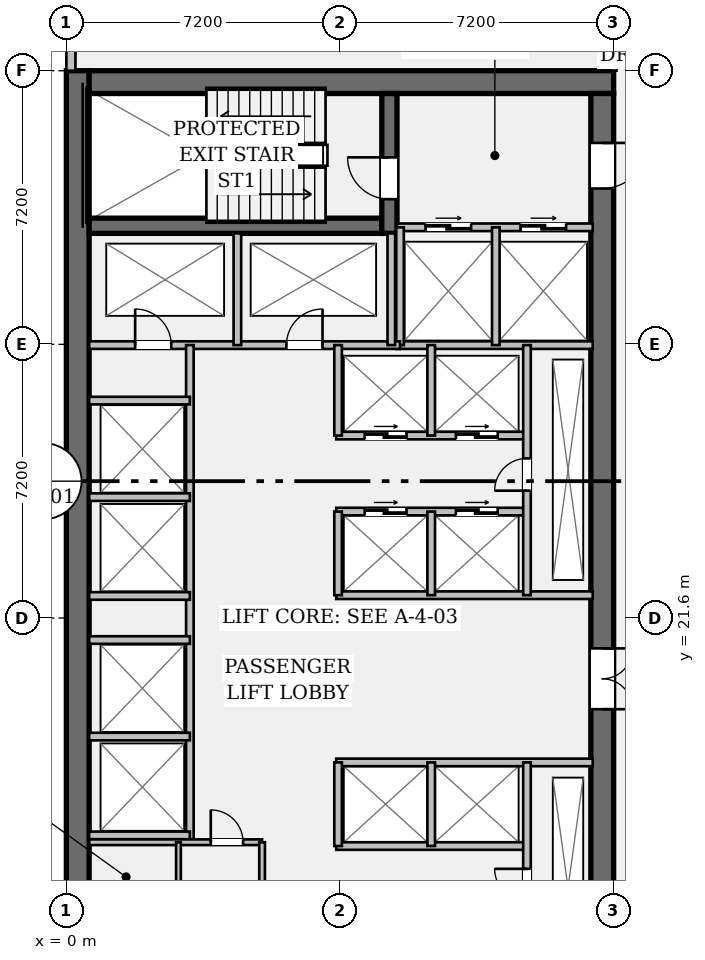
"""IFC4 building model, lengths in metres.
Left out: names, types, materials, properties, quantities, classifications, styles, units other than length and angle.
Written with IfcOpenShell. Run it as: python <this file> out.ifc"""

import sys

from ifc_helpers import new_model, si_unit, direction, frame, frame_2d, origin, place, context, subcontext, project, spatial, rectangle, extrude, element, fill, save


model = new_model("IFC4")
c1 = context("Model", 3, precision=1e-05, world=origin(), true_north=direction((0.0, 1.0)))
c2 = subcontext(c1, "Body", "Model", "MODEL_VIEW")
j1 = project(units=[si_unit("LENGTHUNIT", "METRE"), si_unit("PLANEANGLEUNIT", "RADIAN")], contexts=[c1])
p1 = place(None, origin())
s1 = spatial("IfcSite", under=j1, at=p1, CompositionType="ELEMENT")
p2 = place(p1, origin())
s2 = spatial("IfcBuilding", under=s1, at=p2, CompositionType="ELEMENT")
p3 = place(p2, frame((0.0, 0.0, 9.45)))
s3 = spatial("IfcBuildingStorey", under=s2, at=p3, CompositionType="ELEMENT", Elevation=9.45)
p4 = place(p3, frame((0.3, 7.2, 0.0), z_axis=(0.0, 0.0, 1.0), x_axis=(0.0, 1.0, 0.0)))
e1 = element("IfcWall", 1, at=p4, inside=s3, PredefinedType="SHEAR", context=c2, shape_type="SweptSolid", body=[
    extrude(rectangle(XDim=28.8, YDim=0.6, at=frame_2d((14.4, 0.0))), origin(), (0.0, 0.0, 1.0), 3.9),
])
p5 = place(p3, frame((0.6, 35.7, 0.0), z_axis=(0.0, 0.0, 1.0), x_axis=(1.0, 0.0, 0.0)))
e2 = element("IfcWall", 2, at=p5, inside=s3, PredefinedType="SHEAR", context=c2, shape_type="SweptSolid", body=[
    extrude(rectangle(XDim=13.8, YDim=0.6, at=frame_2d((6.9, 0.0))), origin(), (0.0, 0.0, 1.0), 3.9),
])
p6 = place(p3, frame((14.1, 35.4, 0.0), z_axis=(0.0, 0.0, 1.0), x_axis=(0.0, -1.0, 0.0)))
e3 = element("IfcWall", 3, at=p6, inside=s3, PredefinedType="SHEAR", context=c2, shape_type="SweptSolid", body=[
    extrude(rectangle(XDim=27.6, YDim=0.6, at=frame_2d((13.8, 0.0))), origin(), (0.0, 0.0, 1.0), 3.9),
])
p7 = place(p6, frame((1.3, 0.0, 0.0)))
e4 = element("IfcOpeningElement", 4, at=p7, cuts=e3, PredefinedType="OPENING", context=c2, shape_type="SweptSolid", body=[
    extrude(rectangle(XDim=1.2, YDim=2.15, at=frame_2d((0.6, 1.075))), frame((0.0, 0.312, 0.0), z_axis=(0.0, -1.0, 0.0), x_axis=(1.0, 0.0, 0.0)), (0.0, 0.0, 1.0), 0.624),
])
p8 = place(p6, frame((25.25, 0.0, 0.0)))
e5 = element("IfcOpeningElement", 5, at=p8, cuts=e3, PredefinedType="OPENING", context=c2, shape_type="SweptSolid", body=[
    extrude(rectangle(XDim=1.2, YDim=2.15, at=frame_2d((0.6, 1.075))), frame((0.0, 0.312, 0.0), z_axis=(0.0, -1.0, 0.0), x_axis=(1.0, 0.0, 0.0)), (0.0, 0.0, 1.0), 0.624),
])
p9 = place(p6, frame((14.6, 0.0, 0.0)))
e6 = element("IfcOpeningElement", 6, at=p9, cuts=e3, PredefinedType="OPENING", context=c2, shape_type="SweptSolid", body=[
    extrude(rectangle(XDim=1.6, YDim=2.2, at=frame_2d((0.8, 1.1))), frame((0.0, 0.312, 0.0), z_axis=(0.0, -1.0, 0.0), x_axis=(1.0, 0.0, 0.0)), (0.0, 0.0, 1.0), 0.624),
])
p10 = place(p3, frame((0.6, 31.92, 0.0), z_axis=(0.0, 0.0, 1.0), x_axis=(1.0, 0.0, 0.0)))
e7 = element("IfcWall", 7, at=p10, inside=s3, PredefinedType="SHEAR", context=c2, shape_type="SweptSolid", body=[
    extrude(rectangle(XDim=7.7, YDim=0.4, at=frame_2d((3.85, 0.0))), origin(), (0.0, 0.0, 1.0), 3.9),
])
p11 = place(p3, frame((8.5, 31.72, 0.0), z_axis=(0.0, 0.0, 1.0), x_axis=(0.0, 1.0, 0.0)))
e8 = element("IfcWall", 8, at=p11, inside=s3, PredefinedType="SHEAR", context=c2, shape_type="SweptSolid", body=[
    extrude(rectangle(XDim=3.68, YDim=0.4, at=frame_2d((1.84, 0.0))), origin(), (0.0, 0.0, 1.0), 3.9),
])
p12 = place(p11, frame((0.9, 0.0, 0.0)))
e9 = element("IfcOpeningElement", 9, at=p12, cuts=e8, PredefinedType="OPENING", context=c2, shape_type="SweptSolid", body=[
    extrude(rectangle(XDim=1.1, YDim=2.15, at=frame_2d((0.55, 1.075))), frame((0.0, 0.212, 0.0), z_axis=(0.0, -1.0, 0.0), x_axis=(1.0, 0.0, 0.0)), (0.0, 0.0, 1.0), 0.424),
])
p13 = place(p3, frame((0.12, 36.0, 0.0), z_axis=(0.0, 0.0, 1.0), x_axis=(0.0, 1.0, 0.0)))
e10 = element("IfcWall", 10, at=p13, inside=s3, PredefinedType="STANDARD", context=c2, shape_type="SweptSolid", body=[
    extrude(rectangle(XDim=11.58, YDim=0.24, at=frame_2d((5.79, 0.0))), origin(), (0.0, 0.0, 1.0), 3.9),
])
p14 = place(p13, frame((4.74, 0.0, 0.95)))
e11 = element("IfcOpeningElement", 11, at=p14, cuts=e10, PredefinedType="OPENING", context=c2, shape_type="SweptSolid", body=[
    extrude(rectangle(XDim=2.1, YDim=1.8, at=frame_2d((1.05, 0.9))), frame((0.0, 0.132, 0.0), z_axis=(0.0, -1.0, 0.0), x_axis=(1.0, 0.0, 0.0)), (0.0, 0.0, 1.0), 0.264),
])
p15 = place(p3, frame((8.7, 31.88, 0.0), z_axis=(0.0, 0.0, 1.0), x_axis=(1.0, 0.0, 0.0)))
e12 = element("IfcWall", 12, at=p15, inside=s3, PredefinedType="PARTITIONING", context=c2, shape_type="SweptSolid", body=[
    extrude(rectangle(XDim=5.15, YDim=0.2, at=frame_2d((2.575, 0.0))), origin(), (0.0, 0.0, 1.0), 3.9),
])
p16 = place(p15, frame((0.75, 0.0, 0.0)))
e13 = element("IfcOpeningElement", 13, at=p16, cuts=e12, PredefinedType="OPENING", context=c2, shape_type="SweptSolid", body=[
    extrude(rectangle(XDim=1.2, YDim=2.2, at=frame_2d((0.6, 1.1))), frame((0.0, 0.112, 0.0), z_axis=(0.0, -1.0, 0.0), x_axis=(1.0, 0.0, 0.0)), (0.0, 0.0, 1.0), 0.224),
])
p17 = place(p15, frame((3.25, 0.0, 0.0)))
e14 = element("IfcOpeningElement", 14, at=p17, cuts=e12, PredefinedType="OPENING", context=c2, shape_type="SweptSolid", body=[
    extrude(rectangle(XDim=1.2, YDim=2.2, at=frame_2d((0.6, 1.1))), frame((0.0, 0.112, 0.0), z_axis=(0.0, -1.0, 0.0), x_axis=(1.0, 0.0, 0.0)), (0.0, 0.0, 1.0), 0.224),
])
p18 = place(p3, frame((8.7, 28.78, 0.0), z_axis=(0.0, 0.0, 1.0), x_axis=(1.0, 0.0, 0.0)))
e15 = element("IfcWall", 15, at=p18, inside=s3, PredefinedType="PARTITIONING", context=c2, shape_type="SweptSolid", body=[
    extrude(rectangle(XDim=5.15, YDim=0.2, at=frame_2d((2.575, 0.0))), origin(), (0.0, 0.0, 1.0), 3.9),
])
for number, where, z_axis, x_axis in (
    (16, (8.78, 28.78, 0.0), (0.0, 0.0, 1.0), (0.0, 1.0, 0.0)),
    (17, (11.3, 28.78, 0.0), (0.0, 0.0, 1.0), (0.0, 1.0, 0.0)),
):
    element("IfcWall", number, at=place(p3, frame(where, z_axis=z_axis, x_axis=x_axis)), inside=s3, PredefinedType="PARTITIONING", context=c2, shape_type="SweptSolid", body=[
        extrude(rectangle(XDim=3.1, YDim=0.2, at=frame_2d((1.55, 0.0))), origin(), (0.0, 0.0, 1.0), 3.9),
    ])
p19 = place(p3, frame((0.6, 28.78, 0.0), z_axis=(0.0, 0.0, 1.0), x_axis=(1.0, 0.0, 0.0)))
e18 = element("IfcWall", 18, at=p19, inside=s3, PredefinedType="PARTITIONING", context=c2, shape_type="SweptSolid", body=[
    extrude(rectangle(XDim=8.18, YDim=0.2, at=frame_2d((4.09, 0.0))), origin(), (0.0, 0.0, 1.0), 3.9),
])
p20 = place(p19, frame((1.21, 0.0, 0.0)))
e19 = element("IfcOpeningElement", 19, at=p20, cuts=e18, PredefinedType="OPENING", context=c2, shape_type="SweptSolid", body=[
    extrude(rectangle(XDim=0.95, YDim=2.15, at=frame_2d((0.475, 1.075))), frame((0.0, 0.112, 0.0), z_axis=(0.0, -1.0, 0.0), x_axis=(1.0, 0.0, 0.0)), (0.0, 0.0, 1.0), 0.224),
])
p21 = place(p19, frame((5.19, 0.0, 0.0)))
e20 = element("IfcOpeningElement", 20, at=p21, cuts=e18, PredefinedType="OPENING", context=c2, shape_type="SweptSolid", body=[
    extrude(rectangle(XDim=0.95, YDim=2.15, at=frame_2d((0.475, 1.075))), frame((0.0, 0.112, 0.0), z_axis=(0.0, -1.0, 0.0), x_axis=(1.0, 0.0, 0.0)), (0.0, 0.0, 1.0), 0.224),
])
for number, where, z_axis, x_axis in (
    (21, (4.5, 28.78, 0.0), (0.0, 0.0, 1.0), (0.0, 1.0, 0.0)),
    (22, (8.55, 28.78, 0.0), (0.0, 0.0, 1.0), (0.0, 1.0, 0.0)),
):
    element("IfcWall", number, at=place(p3, frame(where, z_axis=z_axis, x_axis=x_axis)), inside=s3, PredefinedType="PARTITIONING", context=c2, shape_type="SweptSolid", body=[
        extrude(rectangle(XDim=2.94, YDim=0.2, at=frame_2d((1.47, 0.0))), origin(), (0.0, 0.0, 1.0), 3.9),
    ])
p22 = place(p3, frame((3.25, 15.7, 0.0), z_axis=(0.0, 0.0, 1.0), x_axis=(0.0, 1.0, 0.0)))
e23 = element("IfcWall", 23, at=p22, inside=s3, PredefinedType="PARTITIONING", context=c2, shape_type="SweptSolid", body=[
    extrude(rectangle(XDim=13.08, YDim=0.2, at=frame_2d((6.54, 0.0))), origin(), (0.0, 0.0, 1.0), 3.9),
])
for number, where, z_axis, x_axis in (
    (24, (0.6, 15.88, 0.0), (0.0, 0.0, 1.0), (1.0, 0.0, 0.0)),
    (25, (0.6, 18.48, 0.0), (0.0, 0.0, 1.0), (1.0, 0.0, 0.0)),
    (26, (0.6, 22.18, 0.0), (0.0, 0.0, 1.0), (1.0, 0.0, 0.0)),
    (27, (0.6, 24.78, 0.0), (0.0, 0.0, 1.0), (1.0, 0.0, 0.0)),
    (28, (0.6, 21.02, 0.0), (0.0, 0.0, 1.0), (1.0, 0.0, 0.0)),
    (29, (0.6, 27.32, 0.0), (0.0, 0.0, 1.0), (1.0, 0.0, 0.0)),
):
    element("IfcWall", number, at=place(p3, frame(where, z_axis=z_axis, x_axis=x_axis)), inside=s3, PredefinedType="PARTITIONING", context=c2, shape_type="SweptSolid", body=[
        extrude(rectangle(XDim=2.65, YDim=0.2, at=frame_2d((1.325, 0.0))), origin(), (0.0, 0.0, 1.0), 3.9),
    ])
p23 = place(p3, frame((7.1, 22.2, 0.0), z_axis=(0.0, 0.0, 1.0), x_axis=(1.0, 0.0, 0.0)))
e30 = element("IfcWall", 30, at=p23, inside=s3, PredefinedType="PARTITIONING", context=c2, shape_type="SweptSolid", body=[
    extrude(rectangle(XDim=6.75, YDim=0.2, at=frame_2d((3.375, 0.0))), origin(), (0.0, 0.0, 1.0), 3.9),
])
p24 = place(p3, frame((7.1, 24.4, 0.0), z_axis=(0.0, 0.0, 1.0), x_axis=(1.0, 0.0, 0.0)))
e31 = element("IfcWall", 31, at=p24, inside=s3, PredefinedType="PARTITIONING", context=c2, shape_type="SweptSolid", body=[
    extrude(rectangle(XDim=5.02, YDim=0.2, at=frame_2d((2.51, 0.0))), origin(), (0.0, 0.0, 1.0), 3.9),
])
p25 = place(p24, frame((0.75, 0.0, 0.0)))
e32 = element("IfcOpeningElement", 32, at=p25, cuts=e31, PredefinedType="OPENING", context=c2, shape_type="SweptSolid", body=[
    extrude(rectangle(XDim=1.1, YDim=2.2, at=frame_2d((0.55, 1.1))), frame((0.0, 0.112, 0.0), z_axis=(0.0, -1.0, 0.0), x_axis=(1.0, 0.0, 0.0)), (0.0, 0.0, 1.0), 0.224),
])
p26 = place(p24, frame((3.15, 0.0, 0.0)))
e33 = element("IfcOpeningElement", 33, at=p26, cuts=e31, PredefinedType="OPENING", context=c2, shape_type="SweptSolid", body=[
    extrude(rectangle(XDim=1.1, YDim=2.2, at=frame_2d((0.55, 1.1))), frame((0.0, 0.112, 0.0), z_axis=(0.0, -1.0, 0.0), x_axis=(1.0, 0.0, 0.0)), (0.0, 0.0, 1.0), 0.224),
])
p27 = place(p3, frame((7.1, 26.4, 0.0), z_axis=(0.0, 0.0, 1.0), x_axis=(1.0, 0.0, 0.0)))
e34 = element("IfcWall", 34, at=p27, inside=s3, PredefinedType="PARTITIONING", context=c2, shape_type="SweptSolid", body=[
    extrude(rectangle(XDim=5.02, YDim=0.2, at=frame_2d((2.51, 0.0))), origin(), (0.0, 0.0, 1.0), 3.9),
])
p28 = place(p27, frame((0.75, 0.0, 0.0)))
e35 = element("IfcOpeningElement", 35, at=p28, cuts=e34, PredefinedType="OPENING", context=c2, shape_type="SweptSolid", body=[
    extrude(rectangle(XDim=1.1, YDim=2.2, at=frame_2d((0.55, 1.1))), frame((0.0, 0.112, 0.0), z_axis=(0.0, -1.0, 0.0), x_axis=(1.0, 0.0, 0.0)), (0.0, 0.0, 1.0), 0.224),
])
p29 = place(p27, frame((3.15, 0.0, 0.0)))
e36 = element("IfcOpeningElement", 36, at=p29, cuts=e34, PredefinedType="OPENING", context=c2, shape_type="SweptSolid", body=[
    extrude(rectangle(XDim=1.1, YDim=2.2, at=frame_2d((0.55, 1.1))), frame((0.0, 0.112, 0.0), z_axis=(0.0, -1.0, 0.0), x_axis=(1.0, 0.0, 0.0)), (0.0, 0.0, 1.0), 0.224),
])
p30 = place(p3, frame((7.15, 22.2, 0.0), z_axis=(0.0, 0.0, 1.0), x_axis=(0.0, 1.0, 0.0)))
e37 = element("IfcWall", 37, at=p30, inside=s3, PredefinedType="PARTITIONING", context=c2, shape_type="SweptSolid", body=[
    extrude(rectangle(XDim=2.2, YDim=0.2, at=frame_2d((1.1, 0.0))), origin(), (0.0, 0.0, 1.0), 3.9),
])
p31 = place(p3, frame((7.15, 26.4, 0.0), z_axis=(0.0, 0.0, 1.0), x_axis=(0.0, 1.0, 0.0)))
e38 = element("IfcWall", 38, at=p31, inside=s3, PredefinedType="PARTITIONING", context=c2, shape_type="SweptSolid", body=[
    extrude(rectangle(XDim=2.38, YDim=0.2, at=frame_2d((1.19, 0.0))), origin(), (0.0, 0.0, 1.0), 3.9),
])
p32 = place(p3, frame((9.6, 22.2, 0.0), z_axis=(0.0, 0.0, 1.0), x_axis=(0.0, 1.0, 0.0)))
e39 = element("IfcWall", 39, at=p32, inside=s3, PredefinedType="PARTITIONING", context=c2, shape_type="SweptSolid", body=[
    extrude(rectangle(XDim=2.2, YDim=0.2, at=frame_2d((1.1, 0.0))), origin(), (0.0, 0.0, 1.0), 3.9),
])
p33 = place(p3, frame((9.6, 26.4, 0.0), z_axis=(0.0, 0.0, 1.0), x_axis=(0.0, 1.0, 0.0)))
e40 = element("IfcWall", 40, at=p33, inside=s3, PredefinedType="PARTITIONING", context=c2, shape_type="SweptSolid", body=[
    extrude(rectangle(XDim=2.38, YDim=0.2, at=frame_2d((1.19, 0.0))), origin(), (0.0, 0.0, 1.0), 3.9),
])
p34 = place(p3, frame((12.12, 22.2, 0.0), z_axis=(0.0, 0.0, 1.0), x_axis=(0.0, 1.0, 0.0)))
e41 = element("IfcWall", 41, at=p34, inside=s3, PredefinedType="PARTITIONING", context=c2, shape_type="SweptSolid", body=[
    extrude(rectangle(XDim=6.58, YDim=0.2, at=frame_2d((3.29, 0.0))), origin(), (0.0, 0.0, 1.0), 3.9),
])
p35 = place(p34, frame((2.75, 0.0, 0.0)))
e42 = element("IfcOpeningElement", 42, at=p35, cuts=e41, PredefinedType="OPENING", context=c2, shape_type="SweptSolid", body=[
    extrude(rectangle(XDim=0.85, YDim=2.15, at=frame_2d((0.425, 1.075))), frame((0.0, 0.112, 0.0), z_axis=(0.0, -1.0, 0.0), x_axis=(1.0, 0.0, 0.0)), (0.0, 0.0, 1.0), 0.224),
])
p36 = place(p3, frame((7.1, 17.8, 0.0), z_axis=(0.0, 0.0, 1.0), x_axis=(1.0, 0.0, 0.0)))
e43 = element("IfcWall", 43, at=p36, inside=s3, PredefinedType="PARTITIONING", context=c2, shape_type="SweptSolid", body=[
    extrude(rectangle(XDim=6.75, YDim=0.2, at=frame_2d((3.375, 0.0))), origin(), (0.0, 0.0, 1.0), 3.9),
])
p37 = place(p3, frame((7.1, 15.6, 0.0), z_axis=(0.0, 0.0, 1.0), x_axis=(1.0, 0.0, 0.0)))
e44 = element("IfcWall", 44, at=p37, inside=s3, PredefinedType="PARTITIONING", context=c2, shape_type="SweptSolid", body=[
    extrude(rectangle(XDim=5.02, YDim=0.2, at=frame_2d((2.51, 0.0))), origin(), (0.0, 0.0, 1.0), 3.9),
])
for number, where, z_axis, x_axis in (
    (45, (7.15, 15.6, 0.0), (0.0, 0.0, 1.0), (0.0, 1.0, 0.0)),
    (46, (9.6, 15.6, 0.0), (0.0, 0.0, 1.0), (0.0, 1.0, 0.0)),
):
    element("IfcWall", number, at=place(p3, frame(where, z_axis=z_axis, x_axis=x_axis)), inside=s3, PredefinedType="PARTITIONING", context=c2, shape_type="SweptSolid", body=[
        extrude(rectangle(XDim=2.2, YDim=0.2, at=frame_2d((1.1, 0.0))), origin(), (0.0, 0.0, 1.0), 3.9),
    ])
p38 = place(p3, frame((12.12, 11.2, 0.0), z_axis=(0.0, 0.0, 1.0), x_axis=(0.0, 1.0, 0.0)))
e47 = element("IfcWall", 47, at=p38, inside=s3, PredefinedType="PARTITIONING", context=c2, shape_type="SweptSolid", body=[
    extrude(rectangle(XDim=6.6, YDim=0.2, at=frame_2d((3.3, 0.0))), origin(), (0.0, 0.0, 1.0), 3.9),
])
p39 = place(p38, frame((2.95, 0.0, 0.0)))
e48 = element("IfcOpeningElement", 48, at=p39, cuts=e47, PredefinedType="OPENING", context=c2, shape_type="SweptSolid", body=[
    extrude(rectangle(XDim=0.85, YDim=2.15, at=frame_2d((0.425, 1.075))), frame((0.0, 0.112, 0.0), z_axis=(0.0, -1.0, 0.0), x_axis=(1.0, 0.0, 0.0)), (0.0, 0.0, 1.0), 0.224),
])
p40 = place(p3, frame((0.6, 15.7, 0.0), z_axis=(0.0, 0.0, 1.0), x_axis=(1.0, 0.0, 0.0)))
e49 = element("IfcWall", 49, at=p40, inside=s3, PredefinedType="PARTITIONING", context=c2, shape_type="SweptSolid", body=[
    extrude(rectangle(XDim=4.55, YDim=0.15, at=frame_2d((2.275, 0.0))), origin(), (0.0, 0.0, 1.0), 3.9),
])
p41 = place(p40, frame((3.2, 0.0, 0.0)))
e50 = element("IfcOpeningElement", 50, at=p41, cuts=e49, PredefinedType="OPENING", context=c2, shape_type="SweptSolid", body=[
    extrude(rectangle(XDim=0.85, YDim=2.15, at=frame_2d((0.425, 1.075))), frame((0.0, 0.087, 0.0), z_axis=(0.0, -1.0, 0.0), x_axis=(1.0, 0.0, 0.0)), (0.0, 0.0, 1.0), 0.174),
])
p42 = place(p3, frame((5.15, 11.28, 0.0), z_axis=(0.0, 0.0, 1.0), x_axis=(0.0, 1.0, 0.0)))
e51 = element("IfcWall", 51, at=p42, inside=s3, PredefinedType="PARTITIONING", context=c2, shape_type="SweptSolid", body=[
    extrude(rectangle(XDim=4.42, YDim=0.15, at=frame_2d((2.21, 0.0))), origin(), (0.0, 0.0, 1.0), 3.9),
])
p43 = place(p3, frame((2.95, 11.28, 0.0), z_axis=(0.0, 0.0, 1.0), x_axis=(0.0, 1.0, 0.0)))
e52 = element("IfcWall", 52, at=p43, inside=s3, PredefinedType="PARTITIONING", context=c2, shape_type="SweptSolid", body=[
    extrude(rectangle(XDim=4.42, YDim=0.125, at=frame_2d((2.21, 0.0))), origin(), (0.0, 0.0, 1.0), 3.9),
])
p44 = place(p43, frame((1.6, 0.0, 0.0)))
e53 = element("IfcOpeningElement", 53, at=p44, cuts=e52, PredefinedType="OPENING", context=c2, shape_type="SweptSolid", body=[
    extrude(rectangle(XDim=0.85, YDim=2.15, at=frame_2d((0.425, 1.075))), frame((0.0, 0.074, 0.0), z_axis=(0.0, -1.0, 0.0), x_axis=(1.0, 0.0, 0.0)), (0.0, 0.0, 1.0), 0.149),
])
p45 = place(p3, frame((14.4, 36.0, 0.0), z_axis=(0.0, 0.0, 1.0), x_axis=(0.0, 1.0, 0.0)))
e54 = element("IfcWall", 54, at=p45, inside=s3, PredefinedType="PARTITIONING", context=c2, shape_type="SweptSolid", body=[
    extrude(rectangle(XDim=7.9, YDim=0.15, at=frame_2d((3.95, 0.0))), origin(), (0.0, 0.0, 1.0), 2.938),
])
p46 = place(p45, frame((2.6, 0.0, 0.0)))
e55 = element("IfcOpeningElement", 55, at=p46, cuts=e54, PredefinedType="OPENING", context=c2, shape_type="SweptSolid", body=[
    extrude(rectangle(XDim=1.0, YDim=2.15, at=frame_2d((0.5, 1.075))), frame((0.0, 0.087, 0.0), z_axis=(0.0, -1.0, 0.0), x_axis=(1.0, 0.0, 0.0)), (0.0, 0.0, 1.0), 0.174),
])
p47 = place(p12, origin())
e56 = element("IfcDoor", 56, at=p47, inside=s3, OperationType="SINGLE_SWING_RIGHT", PredefinedType="DOOR", context=c2, shape_type="SweptSolid", body=[
    extrude(rectangle(XDim=1.1, YDim=2.15, at=frame_2d((0.55, 1.075))), frame((0.0, 0.025, 0.0), z_axis=(0.0, -1.0, 0.0), x_axis=(1.0, 0.0, 0.0)), (0.0, 0.0, 1.0), 0.05),
])
fill(e9, e56)
p48 = place(p7, origin())
e57 = element("IfcDoor", 57, at=p48, inside=s3, OperationType="SINGLE_SWING_LEFT", PredefinedType="DOOR", context=c2, shape_type="SweptSolid", body=[
    extrude(rectangle(XDim=1.2, YDim=2.15, at=frame_2d((0.6, 1.075))), frame((0.0, 0.025, 0.0), z_axis=(0.0, -1.0, 0.0), x_axis=(1.0, 0.0, 0.0)), (0.0, 0.0, 1.0), 0.05),
])
fill(e4, e57)
p49 = place(p16, origin())
e58 = element("IfcDoor", 58, at=p49, inside=s3, OperationType="DOUBLE_DOOR_SLIDING", PredefinedType="DOOR", context=c2, shape_type="SweptSolid", body=[
    extrude(rectangle(XDim=1.2, YDim=2.2, at=frame_2d((0.6, 1.1))), frame((0.0, 0.025, 0.0), z_axis=(0.0, -1.0, 0.0), x_axis=(1.0, 0.0, 0.0)), (0.0, 0.0, 1.0), 0.05),
])
fill(e13, e58)
p50 = place(p17, origin())
e59 = element("IfcDoor", 59, at=p50, inside=s3, OperationType="DOUBLE_DOOR_SLIDING", PredefinedType="DOOR", context=c2, shape_type="SweptSolid", body=[
    extrude(rectangle(XDim=1.2, YDim=2.2, at=frame_2d((0.6, 1.1))), frame((0.0, 0.025, 0.0), z_axis=(0.0, -1.0, 0.0), x_axis=(1.0, 0.0, 0.0)), (0.0, 0.0, 1.0), 0.05),
])
fill(e14, e59)
p51 = place(p20, origin())
e60 = element("IfcDoor", 60, at=p51, inside=s3, OperationType="SINGLE_SWING_LEFT", PredefinedType="DOOR", context=c2, shape_type="SweptSolid", body=[
    extrude(rectangle(XDim=0.95, YDim=2.15, at=frame_2d((0.475, 1.075))), frame((0.0, 0.025, 0.0), z_axis=(0.0, -1.0, 0.0), x_axis=(1.0, 0.0, 0.0)), (0.0, 0.0, 1.0), 0.05),
])
fill(e19, e60)
p52 = place(p21, origin())
e61 = element("IfcDoor", 61, at=p52, inside=s3, OperationType="SINGLE_SWING_RIGHT", PredefinedType="DOOR", context=c2, shape_type="SweptSolid", body=[
    extrude(rectangle(XDim=0.95, YDim=2.15, at=frame_2d((0.475, 1.075))), frame((0.0, 0.025, 0.0), z_axis=(0.0, -1.0, 0.0), x_axis=(1.0, 0.0, 0.0)), (0.0, 0.0, 1.0), 0.05),
])
fill(e20, e61)
p53 = place(p9, origin())
e62 = element("IfcDoor", 62, at=p53, inside=s3, OperationType="DOUBLE_DOOR_SINGLE_SWING", PredefinedType="DOOR", context=c2, shape_type="SweptSolid", body=[
    extrude(rectangle(XDim=1.6, YDim=2.2, at=frame_2d((0.8, 1.1))), frame((0.0, 0.025, 0.0), z_axis=(0.0, -1.0, 0.0), x_axis=(1.0, 0.0, 0.0)), (0.0, 0.0, 1.0), 0.05),
])
fill(e6, e62)
p54 = place(p35, origin())
e63 = element("IfcDoor", 63, at=p54, inside=s3, OperationType="SINGLE_SWING_LEFT", PredefinedType="DOOR", context=c2, shape_type="SweptSolid", body=[
    extrude(rectangle(XDim=0.85, YDim=2.15, at=frame_2d((0.425, 1.075))), frame((0.0, 0.025, 0.0), z_axis=(0.0, -1.0, 0.0), x_axis=(1.0, 0.0, 0.0)), (0.0, 0.0, 1.0), 0.05),
])
fill(e42, e63)
p55 = place(p25, origin())
e64 = element("IfcDoor", 64, at=p55, inside=s3, OperationType="DOUBLE_DOOR_SLIDING", PredefinedType="DOOR", context=c2, shape_type="SweptSolid", body=[
    extrude(rectangle(XDim=1.1, YDim=2.2, at=frame_2d((0.55, 1.1))), frame((0.0, 0.025, 0.0), z_axis=(0.0, -1.0, 0.0), x_axis=(1.0, 0.0, 0.0)), (0.0, 0.0, 1.0), 0.05),
])
fill(e32, e64)
p56 = place(p26, origin())
e65 = element("IfcDoor", 65, at=p56, inside=s3, OperationType="DOUBLE_DOOR_SLIDING", PredefinedType="DOOR", context=c2, shape_type="SweptSolid", body=[
    extrude(rectangle(XDim=1.1, YDim=2.2, at=frame_2d((0.55, 1.1))), frame((0.0, 0.025, 0.0), z_axis=(0.0, -1.0, 0.0), x_axis=(1.0, 0.0, 0.0)), (0.0, 0.0, 1.0), 0.05),
])
fill(e33, e65)
p57 = place(p28, origin())
e66 = element("IfcDoor", 66, at=p57, inside=s3, OperationType="DOUBLE_DOOR_SLIDING", PredefinedType="DOOR", context=c2, shape_type="SweptSolid", body=[
    extrude(rectangle(XDim=1.1, YDim=2.2, at=frame_2d((0.55, 1.1))), frame((0.0, 0.025, 0.0), z_axis=(0.0, -1.0, 0.0), x_axis=(1.0, 0.0, 0.0)), (0.0, 0.0, 1.0), 0.05),
])
fill(e35, e66)
p58 = place(p29, origin())
e67 = element("IfcDoor", 67, at=p58, inside=s3, OperationType="DOUBLE_DOOR_SLIDING", PredefinedType="DOOR", context=c2, shape_type="SweptSolid", body=[
    extrude(rectangle(XDim=1.1, YDim=2.2, at=frame_2d((0.55, 1.1))), frame((0.0, 0.025, 0.0), z_axis=(0.0, -1.0, 0.0), x_axis=(1.0, 0.0, 0.0)), (0.0, 0.0, 1.0), 0.05),
])
fill(e36, e67)
p59 = place(p39, origin())
e68 = element("IfcDoor", 68, at=p59, inside=s3, OperationType="SINGLE_SWING_RIGHT", PredefinedType="DOOR", context=c2, shape_type="SweptSolid", body=[
    extrude(rectangle(XDim=0.85, YDim=2.15, at=frame_2d((0.425, 1.075))), frame((0.0, 0.025, 0.0), z_axis=(0.0, -1.0, 0.0), x_axis=(1.0, 0.0, 0.0)), (0.0, 0.0, 1.0), 0.05),
])
fill(e48, e68)
p60 = place(p41, origin())
e69 = element("IfcDoor", 69, at=p60, inside=s3, OperationType="SINGLE_SWING_LEFT", PredefinedType="DOOR", context=c2, shape_type="SweptSolid", body=[
    extrude(rectangle(XDim=0.85, YDim=2.15, at=frame_2d((0.425, 1.075))), frame((0.0, 0.025, 0.0), z_axis=(0.0, -1.0, 0.0), x_axis=(1.0, 0.0, 0.0)), (0.0, 0.0, 1.0), 0.05),
])
fill(e50, e69)
save(model, sys.argv[1])
